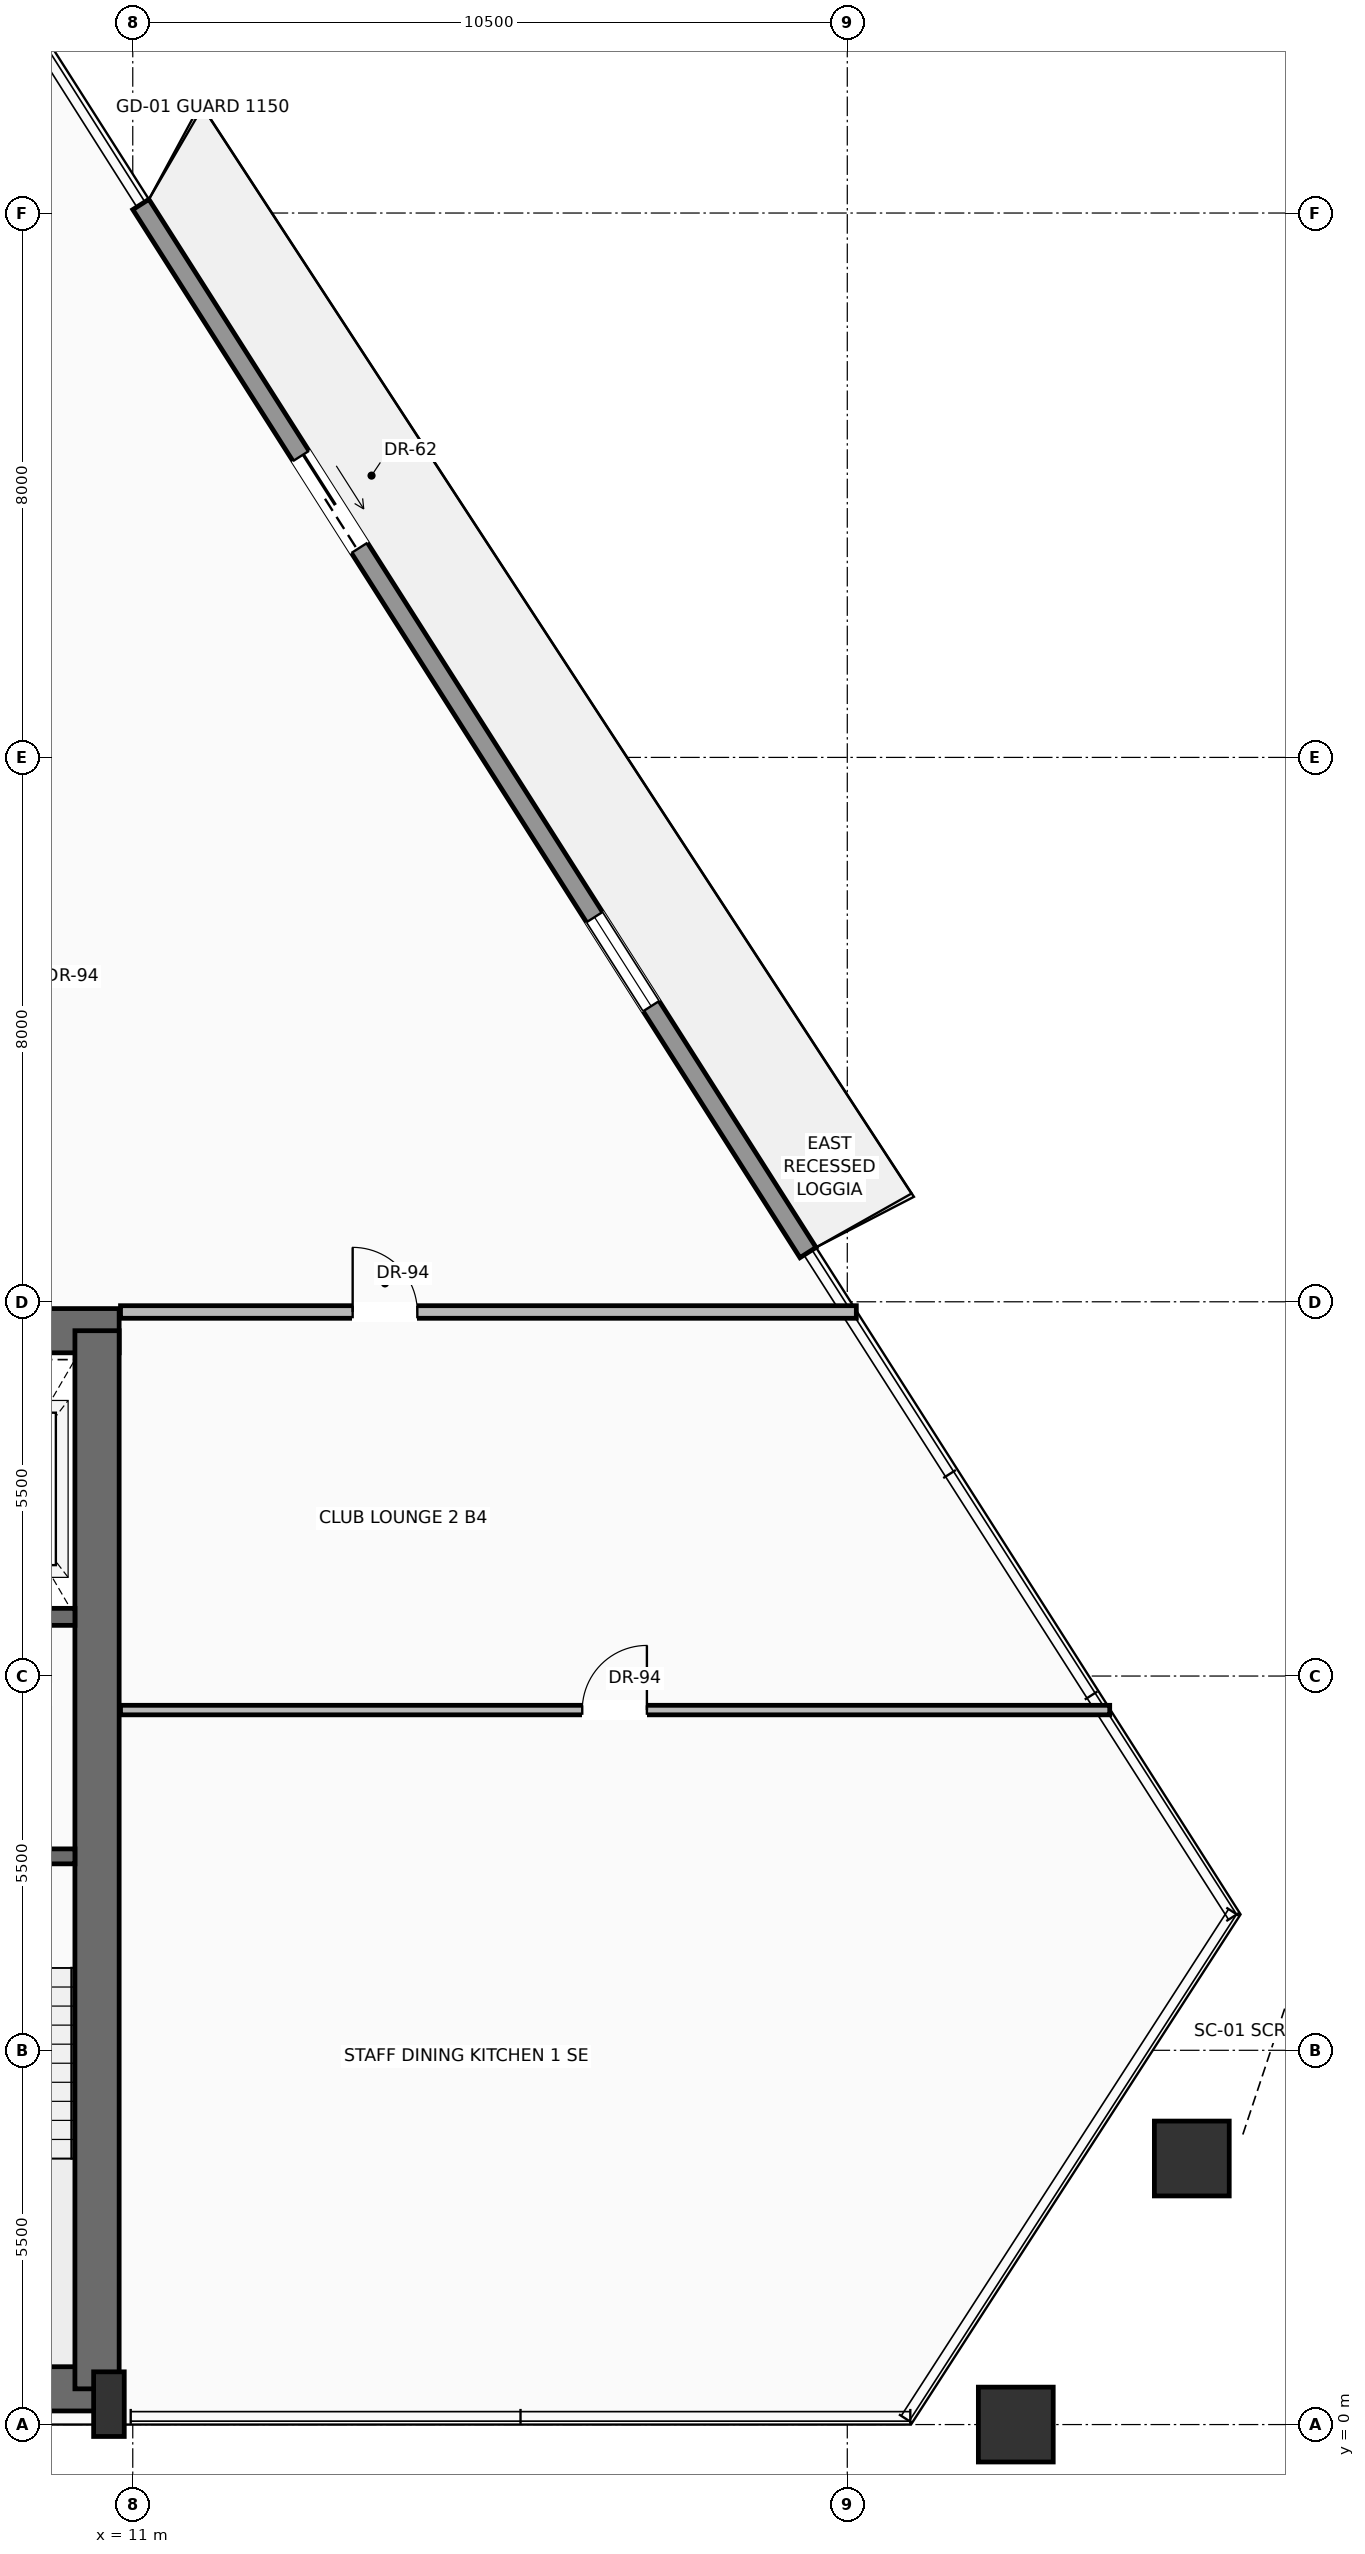
"""IFC4 building model, lengths in metres.
Left out: names, types, materials, properties, quantities, classifications, styles, units other than length and angle.
Written with IfcOpenShell. Run it as: python <this file> out.ifc"""

import sys

from ifc_helpers import new_model, si_unit, direction, frame, frame_2d, origin, origin_2d, place, context, subcontext, project, spatial, rectangle, hollow_rectangle, extrude, source, transform, mapped, element, fill, save


model = new_model("IFC4")
c1 = context("Model", 3, precision=1e-05, world=origin(), true_north=direction((0.0, 1.0)))
c2 = subcontext(c1, "Body", "Model", "MODEL_VIEW")
j1 = project(units=[si_unit("LENGTHUNIT", "METRE"), si_unit("PLANEANGLEUNIT", "RADIAN")], contexts=[c1])
p1 = place(None, origin())
s1 = spatial("IfcSite", under=j1, at=p1, CompositionType="ELEMENT")
p2 = place(p1, origin())
s2 = spatial("IfcBuilding", under=s1, at=p2, CompositionType="ELEMENT")
p3 = place(p2, frame((0.0, 0.0, 147.8)))
s3 = spatial("IfcBuildingStorey", under=s2, at=p3, CompositionType="ELEMENT", Elevation=147.8)
p4 = place(p3, frame((-10.65, 0.525, 0.0), z_axis=(0.0, 0.0, 1.0), x_axis=(1.0, 0.0, 0.0)))
e1 = element("IfcWall", 1, at=p4, inside=s3, PredefinedType="SHEAR", context=c2, shape_type="SweptSolid", body=[
    extrude(rectangle(XDim=21.3, YDim=0.65, at=frame_2d((10.65, 0.0))), origin(), (0.0, 0.0, 1.0), 3.47),
])
p5 = place(p3, frame((-10.8, 16.075, 0.0), z_axis=(0.0, 0.0, 1.0), x_axis=(1.0, 0.0, 0.0)))
e2 = element("IfcWall", 2, at=p5, inside=s3, PredefinedType="SHEAR", context=c2, shape_type="SweptSolid", body=[
    extrude(rectangle(XDim=21.6, YDim=0.65, at=frame_2d((10.8, 0.0))), origin(), (0.0, 0.0, 1.0), 3.47),
])
p6 = place(p5, frame((3.37, 0.0, 0.0)))
e3 = element("IfcOpeningElement", 3, at=p6, cuts=e2, PredefinedType="OPENING", context=c2, shape_type="SweptSolid", body=[
    extrude(rectangle(XDim=1.3, YDim=2.3, at=frame_2d((0.65, 1.15))), frame((0.0, 0.335, 0.0), z_axis=(0.0, -1.0, 0.0), x_axis=(1.0, 0.0, 0.0)), (0.0, 0.0, 1.0), 0.67),
])
p7 = place(p5, frame((9.8, 0.0, 0.0)))
e4 = element("IfcOpeningElement", 4, at=p7, cuts=e2, PredefinedType="OPENING", context=c2, shape_type="SweptSolid", body=[
    extrude(rectangle(XDim=2.0, YDim=2.4, at=frame_2d((1.0, 1.2))), frame((0.0, 0.335, 0.0), z_axis=(0.0, -1.0, 0.0), x_axis=(1.0, 0.0, 0.0)), (0.0, 0.0, 1.0), 0.67),
])
p8 = place(p3, frame((10.475, 0.525, 0.0), z_axis=(0.0, 0.0, 1.0), x_axis=(0.0, 1.0, 0.0)))
e5 = element("IfcWall", 5, at=p8, inside=s3, PredefinedType="SHEAR", context=c2, shape_type="SweptSolid", body=[
    extrude(rectangle(XDim=15.55, YDim=0.65, at=frame_2d((7.775, 0.0))), origin(), (0.0, 0.0, 1.0), 3.47),
])
m1 = source(origin(), c2, "Body", "SweptSolid", [
    extrude(rectangle(XDim=0.45, YDim=0.95, at=origin_2d()), origin(), (0.0, 0.0, 1.0), 3.7),
])
p9 = place(p3, frame((10.65, 0.3, 0.0), z_axis=(0.0, 0.0, 1.0), x_axis=(1.0, 0.0, 0.0)))
e6 = element("IfcColumn", 6, at=p9, inside=s3, PredefinedType="PILASTER", context=c2, shape_type="MappedRepresentation", body=[
    mapped(m1, transform((0.0, 0.0, 0.0), scale=1.0)),
])
m2 = source(origin(), c2, "Body", "SweptSolid", [
    extrude(hollow_rectangle(XDim=1.1, YDim=1.1, WallThickness=0.055, at=origin_2d()), origin(), (0.0, 0.0, 1.0), 3.691),
])
p10 = place(p3, frame((23.976, 0.0, 0.004), z_axis=(0.008135189482, 0.0, 0.999966908799), x_axis=(0.0, 1.0, 0.0)))
e7 = element("IfcColumn", 7, at=p10, inside=s3, PredefinedType="COLUMN", context=c2, shape_type="MappedRepresentation", body=[
    mapped(m2, transform((0.0, 0.0, 0.0), scale=1.0)),
])
m3 = source(origin(), c2, "Body", "SweptSolid", [
    extrude(hollow_rectangle(XDim=1.1, YDim=1.1, WallThickness=0.055, at=origin_2d()), origin(), (0.0, 0.0, 1.0), 3.692),
])
p11 = place(p3, frame((26.563, 3.91, 0.004), z_axis=(-0.004232556551, -0.015210750106, 0.999875351505), x_axis=(0.963397793095, -0.268075907644, 0.0)))
e8 = element("IfcColumn", 8, at=p11, inside=s3, PredefinedType="COLUMN", context=c2, shape_type="MappedRepresentation", body=[
    mapped(m3, transform((0.0, 0.0, 0.0), scale=1.0)),
])
p12 = place(p3, frame((11.119, 32.626, 0.0), z_axis=(0.0, 0.0, 1.0), x_axis=(0.536952496922, -0.843612479785, 0.0)))
e9 = element("IfcWall", 9, at=p12, inside=s3, PredefinedType="SOLIDWALL", context=c2, shape_type="SweptSolid", body=[
    extrude(rectangle(XDim=18.258, YDim=0.28, at=frame_2d((9.129, 0.0))), origin(), (0.0, 0.0, 1.0), 3.05),
])
p13 = place(p12, frame((4.382, 0.0, 0.0)))
e10 = element("IfcOpeningElement", 10, at=p13, cuts=e9, PredefinedType="OPENING", context=c2, shape_type="SweptSolid", body=[
    extrude(rectangle(XDim=1.6, YDim=2.35, at=frame_2d((0.8, 1.175))), frame((0.0, 0.15, 0.0), z_axis=(0.0, -1.0, 0.0), x_axis=(1.0, 0.0, 0.0)), (0.0, 0.0, 1.0), 0.3),
])
p14 = place(p12, frame((12.415, 0.0, 0.9)))
e11 = element("IfcOpeningElement", 11, at=p14, cuts=e9, PredefinedType="OPENING", context=c2, shape_type="SweptSolid", body=[
    extrude(rectangle(XDim=1.55, YDim=1.85, at=frame_2d((0.775, 0.925))), frame((0.0, 0.15, 0.0), z_axis=(0.0, -1.0, 0.0), x_axis=(1.0, 0.0, 0.0)), (0.0, 0.0, 1.0), 0.3),
])
p15 = place(p3, frame((10.15, 8.35, 0.0), z_axis=(0.0, 0.0, 1.0), x_axis=(-1.0, 0.0, 0.0)))
e12 = element("IfcWall", 12, at=p15, inside=s3, PredefinedType="SOLIDWALL", context=c2, shape_type="SweptSolid", body=[
    extrude(rectangle(XDim=4.65, YDim=0.22, at=frame_2d((2.325, 0.0))), origin(), (0.0, 0.0, 1.0), 3.47),
])
p16 = place(p15, frame((1.0, 0.0, 0.0)))
e13 = element("IfcOpeningElement", 13, at=p16, cuts=e12, PredefinedType="OPENING", context=c2, shape_type="SweptSolid", body=[
    extrude(rectangle(XDim=1.15, YDim=2.2, at=frame_2d((0.575, 1.1))), frame((0.0, 0.12, 0.0), z_axis=(0.0, -1.0, 0.0), x_axis=(1.0, 0.0, 0.0)), (0.0, 0.0, 1.0), 0.24),
])
p17 = place(p3, frame((10.15, 11.87, 0.0), z_axis=(0.0, 0.0, 1.0), x_axis=(-1.0, 0.0, 0.0)))
e14 = element("IfcWall", 14, at=p17, inside=s3, PredefinedType="SOLIDWALL", context=c2, shape_type="SweptSolid", body=[
    extrude(rectangle(XDim=4.65, YDim=0.25, at=frame_2d((2.325, 0.0))), origin(), (0.0, 0.0, 1.0), 3.47),
])
p18 = place(p17, frame((0.5, 0.0, 0.0)))
e15 = element("IfcOpeningElement", 15, at=p18, cuts=e14, PredefinedType="OPENING", context=c2, shape_type="SweptSolid", body=[
    extrude(rectangle(XDim=1.2, YDim=2.25, at=frame_2d((0.6, 1.125))), frame((0.0, 0.135, 0.0), z_axis=(0.0, -1.0, 0.0), x_axis=(1.0, 0.0, 0.0)), (0.0, 0.0, 1.0), 0.27),
])
p19 = place(p3, frame((10.82, 16.35, 0.0), z_axis=(0.0, 0.0, 1.0), x_axis=(1.0, 0.0, 0.0)))
e16 = element("IfcWall", 16, at=p19, inside=s3, PredefinedType="PARTITIONING", context=c2, shape_type="SweptSolid", body=[
    extrude(rectangle(XDim=10.813, YDim=0.185, at=frame_2d((5.406, 0.0))), origin(), (0.0, 0.0, 1.0), 3.462),
])
p20 = place(p19, frame((3.412, 0.0, 0.0)))
e17 = element("IfcOpeningElement", 17, at=p20, cuts=e16, PredefinedType="OPENING", context=c2, shape_type="SweptSolid", body=[
    extrude(rectangle(XDim=0.95, YDim=2.2, at=frame_2d((0.475, 1.1))), frame((0.0, 0.103, 0.0), z_axis=(0.0, -1.0, 0.0), x_axis=(1.0, 0.0, 0.0)), (0.0, 0.0, 1.0), 0.205),
])
p21 = place(p3, frame((10.82, 10.5, 0.0), z_axis=(0.0, 0.0, 1.0), x_axis=(1.0, 0.0, 0.0)))
e18 = element("IfcWall", 18, at=p21, inside=s3, PredefinedType="PARTITIONING", context=c2, shape_type="SweptSolid", body=[
    extrude(rectangle(XDim=14.536, YDim=0.14, at=frame_2d((7.268, 0.0))), origin(), (0.0, 0.0, 1.0), 3.462),
])
p22 = place(p21, frame((6.785, 0.0, 0.0)))
e19 = element("IfcOpeningElement", 19, at=p22, cuts=e18, PredefinedType="OPENING", context=c2, shape_type="SweptSolid", body=[
    extrude(rectangle(XDim=0.95, YDim=2.2, at=frame_2d((0.475, 1.1))), frame((0.0, 0.08, 0.0), z_axis=(0.0, -1.0, 0.0), x_axis=(1.0, 0.0, 0.0)), (0.0, 0.0, 1.0), 0.16),
])
m4 = source(origin(), c2, "Body", "SweptSolid", [
    extrude(rectangle(XDim=1.6, YDim=2.35, at=frame_2d((0.8, 1.175))), frame((0.0, 0.025, 0.0), z_axis=(0.0, -1.0, 0.0), x_axis=(1.0, 0.0, 0.0)), (0.0, 0.0, 1.0), 0.05),
])
p23 = place(p13, origin())
e20 = element("IfcDoor", 20, at=p23, inside=s3, OperationType="SLIDING_TO_RIGHT", PredefinedType="DOOR", context=c2, shape_type="MappedRepresentation", body=[
    mapped(m4, transform((0.0, 0.0, 0.0), scale=1.0)),
])
fill(e10, e20)
m5 = source(origin(), c2, "Body", "SweptSolid", [
    extrude(rectangle(XDim=1.55, YDim=1.85, at=frame_2d((0.775, 0.925))), frame((0.0, 0.03, 0.0), z_axis=(0.0, -1.0, 0.0), x_axis=(1.0, 0.0, 0.0)), (0.0, 0.0, 1.0), 0.06),
])
p24 = place(p14, origin())
e21 = element("IfcWindow", 21, at=p24, inside=s3, PartitioningType="SINGLE_PANEL", PredefinedType="WINDOW", context=c2, shape_type="MappedRepresentation", body=[
    mapped(m5, transform((0.0, 0.0, 0.0), scale=1.0)),
])
fill(e11, e21)
m6 = source(origin(), c2, "Body", "SweptSolid", [
    extrude(rectangle(XDim=0.95, YDim=2.2, at=frame_2d((0.475, 1.1))), frame((0.0, 0.025, 0.0), z_axis=(0.0, -1.0, 0.0), x_axis=(1.0, 0.0, 0.0)), (0.0, 0.0, 1.0), 0.05),
])
p25 = place(p20, origin())
e22 = element("IfcDoor", 22, at=p25, inside=s3, OperationType="SINGLE_SWING_LEFT", PredefinedType="DOOR", context=c2, shape_type="MappedRepresentation", body=[
    mapped(m6, transform((0.0, 0.0, 0.0), scale=1.0)),
])
fill(e17, e22)
p26 = place(p22, origin())
e23 = element("IfcDoor", 23, at=p26, inside=s3, OperationType="SINGLE_SWING_RIGHT", PredefinedType="DOOR", context=c2, shape_type="MappedRepresentation", body=[
    mapped(m6, transform((0.0, 0.0, 0.0), scale=1.0)),
])
fill(e19, e23)
save(model, sys.argv[1])
